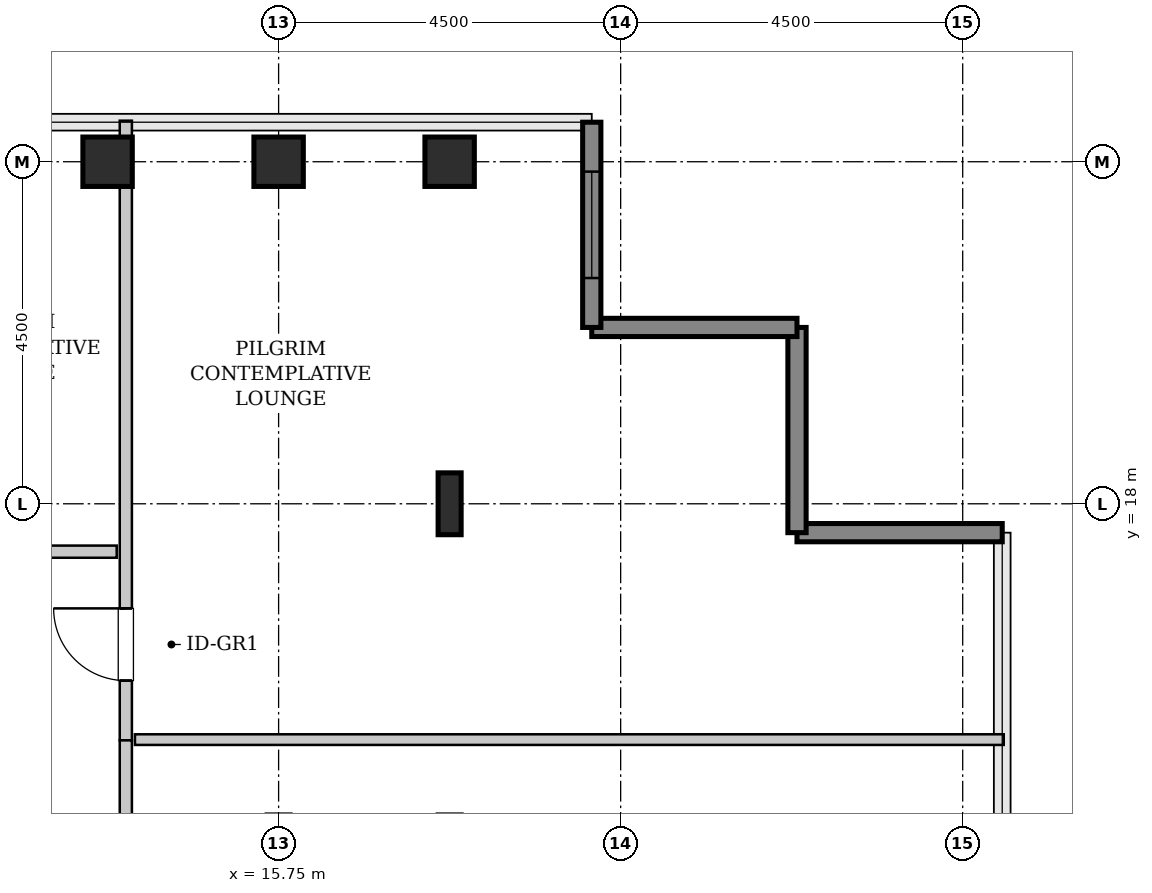
"""IFC4 building model, lengths in metres.
Left out: names, types, materials, properties, quantities, classifications, styles, units other than length and angle.
Written with IfcOpenShell. Run it as: python <this file> out.ifc"""

import sys

from ifc_helpers import new_model, si_unit, direction, frame, frame_2d, origin, origin_2d, place, context, subcontext, project, spatial, rectangle, hollow_rectangle, i_section, extrude, source, transform, mapped, element, fill, save


model = new_model("IFC4")
c1 = context("Model", 3, precision=1e-05, world=origin(), true_north=direction((0.0, 1.0)))
c2 = subcontext(c1, "Body", "Model", "MODEL_VIEW")
j1 = project(units=[si_unit("LENGTHUNIT", "METRE"), si_unit("PLANEANGLEUNIT", "RADIAN")], contexts=[c1])
p1 = place(None, origin())
s1 = spatial("IfcSite", under=j1, at=p1, CompositionType="ELEMENT")
p2 = place(p1, origin())
s2 = spatial("IfcBuilding", under=s1, at=p2, CompositionType="ELEMENT")
p3 = place(p2, frame((0.0, 0.0, 210.4)))
s3 = spatial("IfcBuildingStorey", under=s2, at=p3, CompositionType="ELEMENT", Elevation=210.4)
m1 = source(origin(), c2, "Body", "SweptSolid", [
    extrude(hollow_rectangle(XDim=0.65, YDim=0.65, WallThickness=0.032, InnerFilletRadius=0.032, OuterFilletRadius=0.064, at=origin_2d()), origin(), (0.0, 0.0, 1.0), 3.8),
])
for number, where, z_axis, x_axis in (
    (1, (13.5, 22.5, 0.0), (0.0, 0.0, 1.0), (1.0, 0.0, 0.0)),
    (2, (15.75, 22.5, 0.0), (0.0, 0.0, 1.0), (1.0, 0.0, 0.0)),
):
    element("IfcColumn", number, at=place(p3, frame(where, z_axis=z_axis, x_axis=x_axis)), inside=s3, PredefinedType="COLUMN", context=c2, shape_type="MappedRepresentation", body=[
        mapped(m1, transform((0.0, 0.0, 0.0), x_axis=(1.0, 0.0, 0.0), y_axis=(0.0, 1.0, 0.0), z_axis=(0.0, 0.0, 1.0), scale=1.0)),
    ])
m2 = source(origin(), c2, "Body", "SweptSolid", [
    extrude(i_section(OverallWidth=0.303, OverallDepth=0.814, WebThickness=0.021, FlangeThickness=0.04, FilletRadius=0.03, at=origin_2d()), origin(), (0.0, 0.0, 1.0), 3.8),
])
p4 = place(p3, frame((18.0, 18.0, 0.0), z_axis=(0.0, 0.0, 1.0), x_axis=(1.0, 0.0, 0.0)))
e3 = element("IfcColumn", 3, at=p4, inside=s3, PredefinedType="COLUMN", context=c2, shape_type="MappedRepresentation", body=[
    mapped(m2, transform((0.0, 0.0, 0.0), x_axis=(1.0, 0.0, 0.0), y_axis=(0.0, 1.0, 0.0), z_axis=(0.0, 0.0, 1.0), scale=1.0)),
])
p5 = place(p3, frame((18.0, 22.5, 0.0), z_axis=(0.0, 0.0, 1.0), x_axis=(1.0, 0.0, 0.0)))
e4 = element("IfcColumn", 4, at=p5, inside=s3, PredefinedType="COLUMN", context=c2, shape_type="MappedRepresentation", body=[
    mapped(m1, transform((0.0, 0.0, 0.0), x_axis=(1.0, 0.0, 0.0), y_axis=(0.0, 1.0, 0.0), z_axis=(0.0, 0.0, 1.0), scale=1.0)),
])
m3 = source(origin(), c2, "Body", "SweptSolid", [
    extrude(rectangle(XDim=2.7, YDim=0.24, at=frame_2d((1.35, 0.0))), origin(), (0.0, 0.0, 1.0), 3.55),
])
for number, where, z_axis, x_axis in (
    (5, (25.27, 17.62, 0.0), (0.0, 0.0, 1.0), (-1.0, 0.0, 0.0)),
    (6, (22.57, 17.62, 0.0), (0.0, 0.0, 1.0), (0.0, 1.0, 0.0)),
    (7, (22.57, 20.32, 0.0), (0.0, 0.0, 1.0), (-1.0, 0.0, 0.0)),
):
    element("IfcWall", number, at=place(p3, frame(where, z_axis=z_axis, x_axis=x_axis)), inside=s3, PredefinedType="SHEAR", context=c2, shape_type="MappedRepresentation", body=[
        mapped(m3, transform((0.0, 0.0, 0.0), x_axis=(1.0, 0.0, 0.0), y_axis=(0.0, 1.0, 0.0), z_axis=(0.0, 0.0, 1.0), scale=1.0)),
    ])
p6 = place(p3, frame((19.87, 20.32, 0.0), z_axis=(0.0, 0.0, 1.0), x_axis=(0.0, 1.0, 0.0)))
e8 = element("IfcWall", 8, at=p6, inside=s3, PredefinedType="SHEAR", context=c2, shape_type="MappedRepresentation", body=[
    mapped(m3, transform((0.0, 0.0, 0.0), x_axis=(1.0, 0.0, 0.0), y_axis=(0.0, 1.0, 0.0), z_axis=(0.0, 0.0, 1.0), scale=1.0)),
])
p7 = place(p6, frame((0.65, 0.0, 0.85)))
e9 = element("IfcOpeningElement", 9, at=p7, cuts=e8, PredefinedType="OPENING", context=c2, shape_type="SweptSolid", body=[
    extrude(rectangle(XDim=1.4, YDim=1.8, at=frame_2d((0.7, 0.9))), frame((0.0, 0.13, 0.0), z_axis=(0.0, -1.0, 0.0), x_axis=(1.0, 0.0, 0.0)), (0.0, 0.0, 1.0), 0.26),
])
m4 = source(origin(), c2, "Body", "SweptSolid", [
    extrude(rectangle(XDim=8.153, YDim=0.16, at=frame_2d((4.076, 0.0))), origin(), (0.0, 0.0, 1.0), 3.535),
])
p8 = place(p3, frame((13.74, 14.887, 0.0), z_axis=(0.0, 0.0, 1.0), x_axis=(0.0, 1.0, 0.0)))
e10 = element("IfcWall", 10, at=p8, inside=s3, PredefinedType="PARTITIONING", context=c2, shape_type="MappedRepresentation", body=[
    mapped(m4, transform((0.0, 0.0, 0.0), x_axis=(1.0, 0.0, 0.0), y_axis=(0.0, 1.0, 0.0), z_axis=(0.0, 0.0, 1.0), scale=1.0)),
])
p9 = place(p8, frame((0.786, 0.0, 0.0)))
e11 = element("IfcOpeningElement", 11, at=p9, cuts=e10, PredefinedType="OPENING", context=c2, shape_type="SweptSolid", body=[
    extrude(rectangle(XDim=0.95, YDim=2.1, at=frame_2d((0.475, 1.05))), frame((0.0, 0.09, 0.0), z_axis=(0.0, -1.0, 0.0), x_axis=(1.0, 0.0, 0.0)), (0.0, 0.0, 1.0), 0.18),
])
m5 = source(origin(), c2, "Body", "SweptSolid", [
    extrude(rectangle(XDim=11.43, YDim=0.14, at=frame_2d((5.715, 0.0))), origin(), (0.0, 0.0, 1.0), 3.535),
])
p10 = place(p3, frame((13.86, 14.897, 0.0), z_axis=(0.0, 0.0, 1.0), x_axis=(1.0, 0.0, 0.0)))
e12 = element("IfcWall", 12, at=p10, inside=s3, PredefinedType="PARTITIONING", context=c2, shape_type="MappedRepresentation", body=[
    mapped(m5, transform((0.0, 0.0, 0.0), x_axis=(1.0, 0.0, 0.0), y_axis=(0.0, 1.0, 0.0), z_axis=(0.0, 0.0, 1.0), scale=1.0)),
])
m6 = source(origin(), c2, "Body", "SweptSolid", [
    extrude(rectangle(XDim=8.093, YDim=0.16, at=frame_2d((4.046, 0.0))), origin(), (0.0, 0.0, 1.0), 3.535),
])
p11 = place(p3, frame((13.74, 6.795, 0.0), z_axis=(0.0, 0.0, 1.0), x_axis=(0.0, 1.0, 0.0)))
e13 = element("IfcWall", 13, at=p11, inside=s3, PredefinedType="PARTITIONING", context=c2, shape_type="MappedRepresentation", body=[
    mapped(m6, transform((0.0, 0.0, 0.0), x_axis=(1.0, 0.0, 0.0), y_axis=(0.0, 1.0, 0.0), z_axis=(0.0, 0.0, 1.0), scale=1.0)),
])
p12 = place(p11, frame((3.571, 0.0, 0.0)))
e14 = element("IfcOpeningElement", 14, at=p12, cuts=e13, PredefinedType="OPENING", context=c2, shape_type="SweptSolid", body=[
    extrude(rectangle(XDim=0.95, YDim=2.1, at=frame_2d((0.475, 1.05))), frame((0.0, 0.09, 0.0), z_axis=(0.0, -1.0, 0.0), x_axis=(1.0, 0.0, 0.0)), (0.0, 0.0, 1.0), 0.18),
])
m7 = source(origin(), c2, "Body", "SweptSolid", [
    extrude(rectangle(XDim=5.425, YDim=0.16, at=frame_2d((2.712, 0.0))), origin(), (0.0, 0.0, 1.0), 3.535),
])
p13 = place(p3, frame((8.195, 17.37, 0.0), z_axis=(0.0, 0.0, 1.0), x_axis=(1.0, 0.0, 0.0)))
e15 = element("IfcWall", 15, at=p13, inside=s3, PredefinedType="PARTITIONING", context=c2, shape_type="MappedRepresentation", body=[
    mapped(m7, transform((0.0, 0.0, 0.0), x_axis=(1.0, 0.0, 0.0), y_axis=(0.0, 1.0, 0.0), z_axis=(0.0, 0.0, 1.0), scale=1.0)),
])
p14 = place(p13, frame((1.611, 0.0, 0.0)))
e16 = element("IfcOpeningElement", 16, at=p14, cuts=e15, PredefinedType="OPENING", context=c2, shape_type="SweptSolid", body=[
    extrude(rectangle(XDim=0.95, YDim=2.1, at=frame_2d((0.475, 1.05))), frame((0.0, 0.09, 0.0), z_axis=(0.0, -1.0, 0.0), x_axis=(1.0, 0.0, 0.0)), (0.0, 0.0, 1.0), 0.18),
])
m8 = source(origin(), c2, "Body", "SweptSolid", [
    extrude(rectangle(XDim=1.4, YDim=1.8, at=frame_2d((0.7, 0.9))), frame((0.0, 0.03, 0.0), z_axis=(0.0, -1.0, 0.0), x_axis=(1.0, 0.0, 0.0)), (0.0, 0.0, 1.0), 0.06),
])
p15 = place(p7, origin())
e17 = element("IfcWindow", 17, at=p15, inside=s3, PartitioningType="SINGLE_PANEL", PredefinedType="WINDOW", context=c2, shape_type="MappedRepresentation", body=[
    mapped(m8, transform((0.0, 0.0, 0.0), x_axis=(1.0, 0.0, 0.0), y_axis=(0.0, 1.0, 0.0), z_axis=(0.0, 0.0, 1.0), scale=1.0)),
])
fill(e9, e17)
m9 = source(origin(), c2, "Body", "SweptSolid", [
    extrude(rectangle(XDim=0.95, YDim=2.1, at=frame_2d((0.475, 1.05))), frame((0.0, 0.025, 0.0), z_axis=(0.0, -1.0, 0.0), x_axis=(1.0, 0.0, 0.0)), (0.0, 0.0, 1.0), 0.05),
])
p16 = place(p9, origin())
e18 = element("IfcDoor", 18, at=p16, inside=s3, OperationType="SINGLE_SWING_RIGHT", PredefinedType="DOOR", context=c2, shape_type="MappedRepresentation", body=[
    mapped(m9, transform((0.0, 0.0, 0.0), x_axis=(1.0, 0.0, 0.0), y_axis=(0.0, 1.0, 0.0), z_axis=(0.0, 0.0, 1.0), scale=1.0)),
])
fill(e11, e18)
save(model, sys.argv[1])
